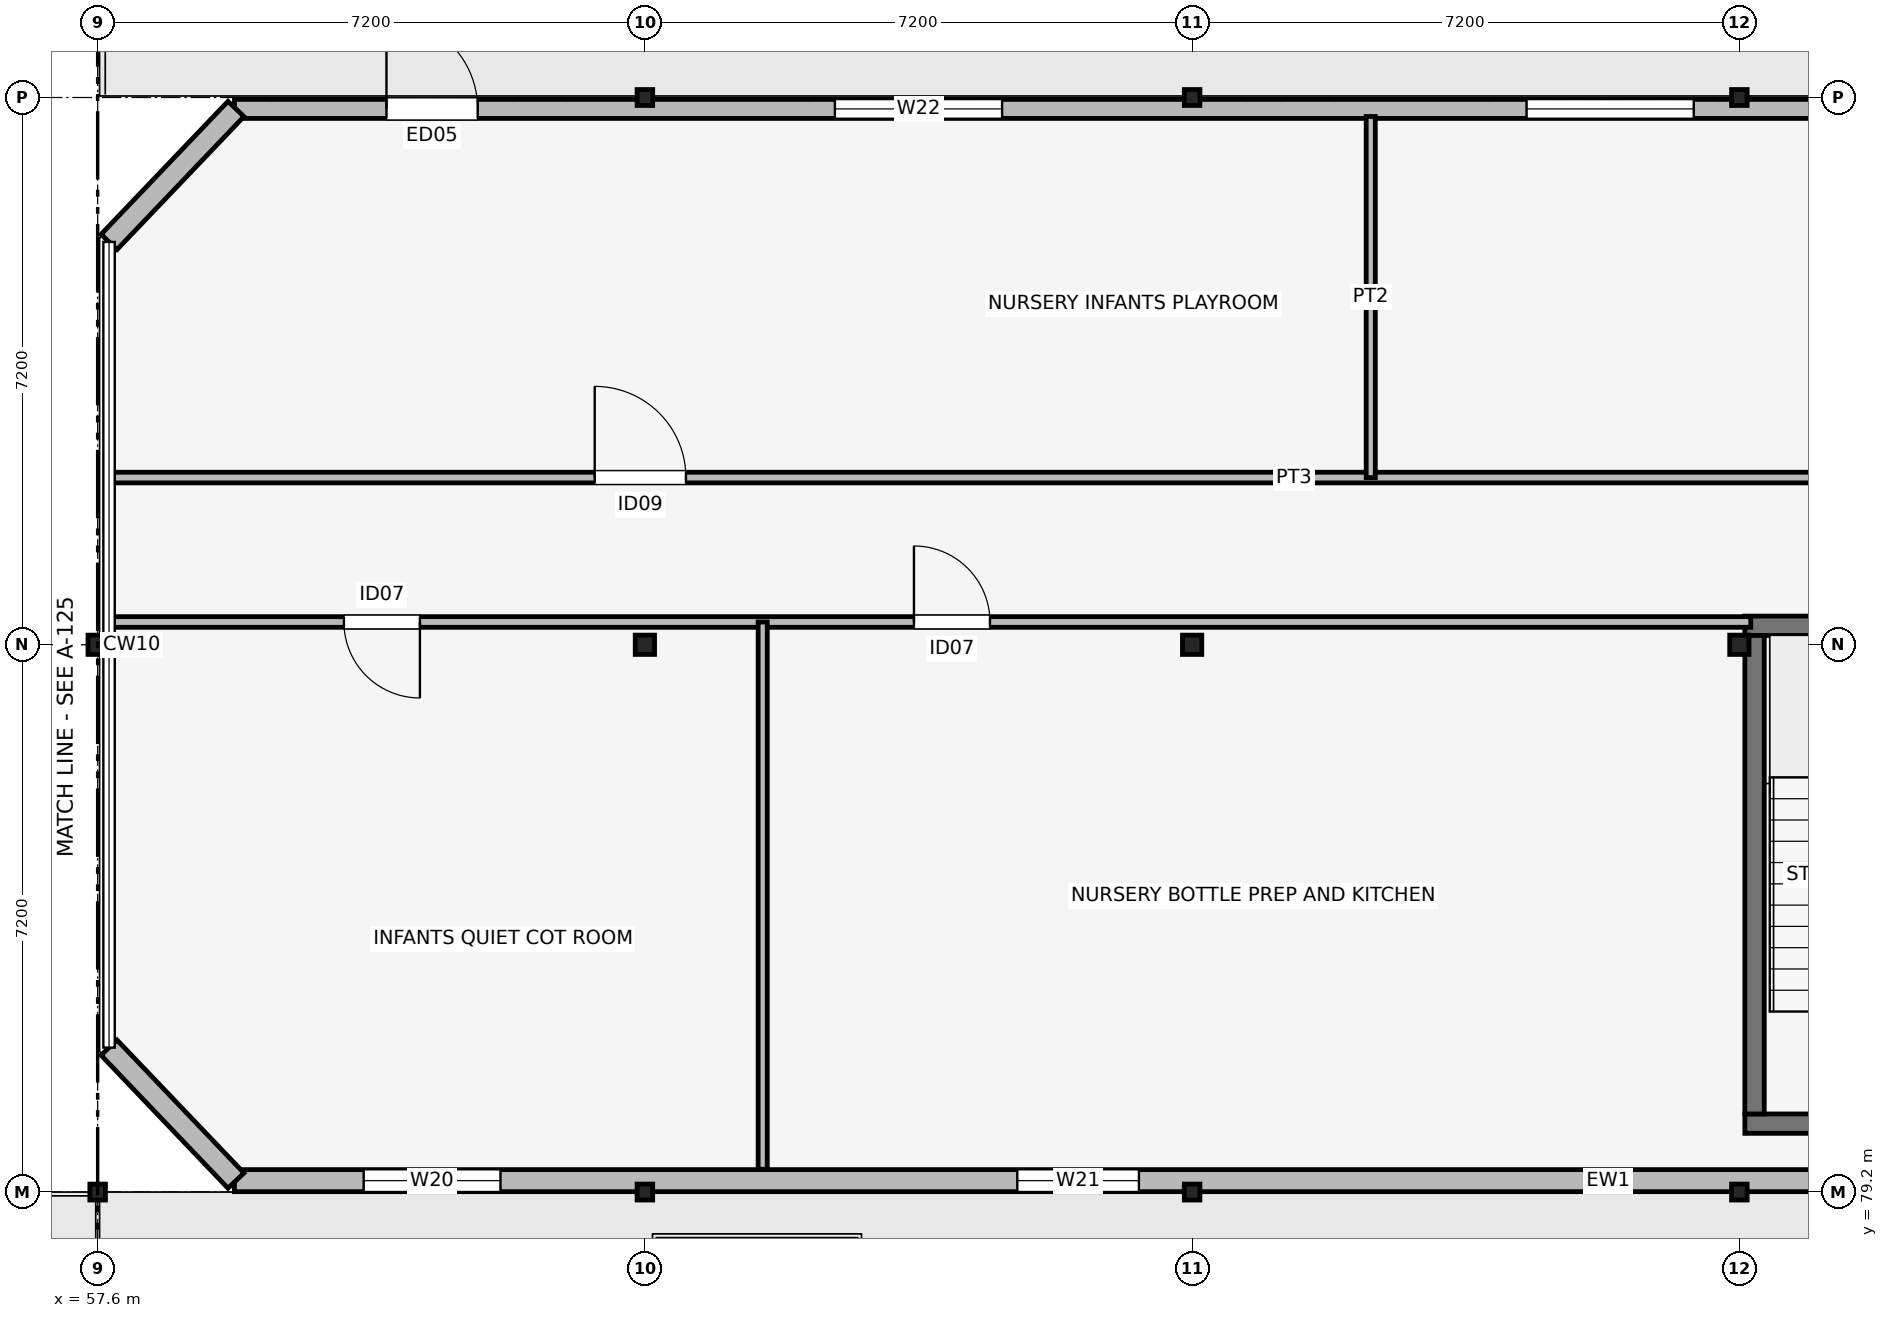
"""IFC4 building model, lengths in metres.
Left out: names, types, materials, properties, quantities, classifications, styles, units other than length and angle.
Written with IfcOpenShell. Run it as: python <this file> out.ifc"""

import sys

from ifc_helpers import new_model, si_unit, direction, frame, frame_2d, origin, origin_2d, place, context, subcontext, project, spatial, rectangle, i_section, extrude, element, fill, save


model = new_model("IFC4")
c1 = context("Model", 3, precision=1e-05, world=origin(), true_north=direction((0.0, 1.0)))
c2 = subcontext(c1, "Body", "Model", "MODEL_VIEW")
j1 = project(units=[si_unit("LENGTHUNIT", "METRE"), si_unit("PLANEANGLEUNIT", "RADIAN")], contexts=[c1])
p1 = place(None, origin())
s1 = spatial("IfcSite", under=j1, at=p1, CompositionType="ELEMENT")
p2 = place(p1, origin())
s2 = spatial("IfcBuilding", under=s1, at=p2, CompositionType="ELEMENT")
p3 = place(p2, frame((0.0, 0.0, 4.5)))
s3 = spatial("IfcBuildingStorey", under=s2, at=p3, CompositionType="ELEMENT", Elevation=4.5)
p4 = place(p3, frame((57.6, 79.2, 0.0), z_axis=(0.0, 0.0, 1.0), x_axis=(1.0, 0.0, 0.0)))
e1 = element("IfcColumn", 1, at=p4, inside=s3, PredefinedType="COLUMN", context=c2, shape_type="SweptSolid", body=[
    extrude(i_section(OverallWidth=0.205, OverallDepth=0.21, WebThickness=0.009, FlangeThickness=0.014, FilletRadius=0.01, at=origin_2d()), origin(), (0.0, 0.0, 1.0), 4.2),
])
p5 = place(p3, frame((57.6, 86.4, 0.0), z_axis=(0.0, 0.0, 1.0), x_axis=(1.0, 0.0, 0.0)))
e2 = element("IfcColumn", 2, at=p5, inside=s3, PredefinedType="COLUMN", context=c2, shape_type="SweptSolid", body=[
    extrude(i_section(OverallWidth=0.254, OverallDepth=0.254, WebThickness=0.009, FlangeThickness=0.014, FilletRadius=0.013, at=origin_2d()), origin(), (0.0, 0.0, 1.0), 4.2),
])
p6 = place(p3, frame((64.8, 79.2, 0.0), z_axis=(0.0, 0.0, 1.0), x_axis=(1.0, 0.0, 0.0)))
e3 = element("IfcColumn", 3, at=p6, inside=s3, PredefinedType="COLUMN", context=c2, shape_type="SweptSolid", body=[
    extrude(i_section(OverallWidth=0.205, OverallDepth=0.21, WebThickness=0.009, FlangeThickness=0.014, FilletRadius=0.01, at=origin_2d()), origin(), (0.0, 0.0, 1.0), 4.2),
])
p7 = place(p3, frame((64.8, 86.4, 0.0), z_axis=(0.0, 0.0, 1.0), x_axis=(1.0, 0.0, 0.0)))
e4 = element("IfcColumn", 4, at=p7, inside=s3, PredefinedType="COLUMN", context=c2, shape_type="SweptSolid", body=[
    extrude(i_section(OverallWidth=0.254, OverallDepth=0.254, WebThickness=0.009, FlangeThickness=0.014, FilletRadius=0.013, at=origin_2d()), origin(), (0.0, 0.0, 1.0), 4.2),
])
for number, where, z_axis, x_axis in (
    (5, (64.8, 93.6, 0.0), (0.0, 0.0, 1.0), (1.0, 0.0, 0.0)),
    (6, (72.0, 79.2, 0.0), (0.0, 0.0, 1.0), (1.0, 0.0, 0.0)),
):
    element("IfcColumn", number, at=place(p3, frame(where, z_axis=z_axis, x_axis=x_axis)), inside=s3, PredefinedType="COLUMN", context=c2, shape_type="SweptSolid", body=[
        extrude(i_section(OverallWidth=0.205, OverallDepth=0.21, WebThickness=0.009, FlangeThickness=0.014, FilletRadius=0.01, at=origin_2d()), origin(), (0.0, 0.0, 1.0), 4.2),
    ])
p8 = place(p3, frame((72.0, 86.4, 0.0), z_axis=(0.0, 0.0, 1.0), x_axis=(1.0, 0.0, 0.0)))
e7 = element("IfcColumn", 7, at=p8, inside=s3, PredefinedType="COLUMN", context=c2, shape_type="SweptSolid", body=[
    extrude(i_section(OverallWidth=0.254, OverallDepth=0.254, WebThickness=0.009, FlangeThickness=0.014, FilletRadius=0.013, at=origin_2d()), origin(), (0.0, 0.0, 1.0), 4.2),
])
for number, where, z_axis, x_axis in (
    (8, (72.0, 93.6, 0.0), (0.0, 0.0, 1.0), (1.0, 0.0, 0.0)),
    (9, (79.2, 79.2, 0.0), (0.0, 0.0, 1.0), (1.0, 0.0, 0.0)),
):
    element("IfcColumn", number, at=place(p3, frame(where, z_axis=z_axis, x_axis=x_axis)), inside=s3, PredefinedType="COLUMN", context=c2, shape_type="SweptSolid", body=[
        extrude(i_section(OverallWidth=0.205, OverallDepth=0.21, WebThickness=0.009, FlangeThickness=0.014, FilletRadius=0.01, at=origin_2d()), origin(), (0.0, 0.0, 1.0), 4.2),
    ])
p9 = place(p3, frame((79.2, 86.4, 0.0), z_axis=(0.0, 0.0, 1.0), x_axis=(1.0, 0.0, 0.0)))
e10 = element("IfcColumn", 10, at=p9, inside=s3, PredefinedType="COLUMN", context=c2, shape_type="SweptSolid", body=[
    extrude(i_section(OverallWidth=0.254, OverallDepth=0.254, WebThickness=0.009, FlangeThickness=0.014, FilletRadius=0.013, at=origin_2d()), origin(), (0.0, 0.0, 1.0), 4.2),
])
p10 = place(p3, frame((79.2, 93.6, 0.0), z_axis=(0.0, 0.0, 1.0), x_axis=(1.0, 0.0, 0.0)))
e11 = element("IfcColumn", 11, at=p10, inside=s3, PredefinedType="COLUMN", context=c2, shape_type="SweptSolid", body=[
    extrude(i_section(OverallWidth=0.205, OverallDepth=0.21, WebThickness=0.009, FlangeThickness=0.014, FilletRadius=0.01, at=origin_2d()), origin(), (0.0, 0.0, 1.0), 4.2),
])
for number, where, z_axis, x_axis in (
    (12, (79.272, 80.1, 0.0), (0.0, 0.0, 1.0), (1.0, 0.0, 0.0)),
    (13, (79.272, 86.65, 0.0), (0.0, 0.0, 1.0), (1.0, 0.0, 0.0)),
):
    element("IfcWall", number, at=place(p3, frame(where, z_axis=z_axis, x_axis=x_axis)), inside=s3, PredefinedType="SHEAR", context=c2, shape_type="SweptSolid", body=[
        extrude(rectangle(XDim=3.305, YDim=0.255, at=frame_2d((1.652, 0.0))), origin(), (0.0, 0.0, 1.0), 4.2),
    ])
p11 = place(p3, frame((79.4, 80.228, 0.0), z_axis=(0.0, 0.0, 1.0), x_axis=(0.0, 1.0, 0.0)))
e14 = element("IfcWall", 14, at=p11, inside=s3, PredefinedType="SHEAR", context=c2, shape_type="SweptSolid", body=[
    extrude(rectangle(XDim=6.295, YDim=0.255, at=frame_2d((3.147, 0.0))), origin(), (0.0, 0.0, 1.0), 4.2),
])
p12 = place(p3, frame((59.4, 79.35, 0.0), z_axis=(0.0, 0.0, 1.0), x_axis=(1.0, 0.0, 0.0)))
e15 = element("IfcWall", 15, at=p12, inside=s3, PredefinedType="SOLIDWALL", context=c2, shape_type="SweptSolid", body=[
    extrude(rectangle(XDim=46.8, YDim=0.29, at=frame_2d((23.4, 0.0))), origin(), (0.0, 0.0, 1.0), 3.448),
])
p13 = place(p12, frame((25.75, 0.0, 0.0), z_axis=(0.0, 0.0, 1.0), x_axis=(-1.0, 0.0, 0.0)))
e16 = element("IfcOpeningElement", 16, at=p13, cuts=e15, PredefinedType="OPENING", context=c2, shape_type="SweptSolid", body=[
    extrude(rectangle(XDim=1.5, YDim=2.35, at=frame_2d((0.75, 1.175))), frame((0.0, 0.155, 0.0), z_axis=(0.0, -1.0, 0.0), x_axis=(1.0, 0.0, 0.0)), (0.0, 0.0, 1.0), 0.31),
])
p14 = place(p12, frame((44.8, 0.0, 0.0), z_axis=(0.0, 0.0, 1.0), x_axis=(-1.0, 0.0, 0.0)))
e17 = element("IfcOpeningElement", 17, at=p14, cuts=e15, PredefinedType="OPENING", context=c2, shape_type="SweptSolid", body=[
    extrude(rectangle(XDim=1.2, YDim=2.2, at=frame_2d((0.6, 1.1))), frame((0.0, 0.155, 0.0), z_axis=(0.0, -1.0, 0.0), x_axis=(1.0, 0.0, 0.0)), (0.0, 0.0, 1.0), 0.31),
])
p15 = place(p12, frame((1.7, 0.0, 1.1)))
e18 = element("IfcOpeningElement", 18, at=p15, cuts=e15, PredefinedType="OPENING", context=c2, shape_type="SweptSolid", body=[
    extrude(rectangle(XDim=1.8, YDim=1.2, at=frame_2d((0.9, 0.6))), frame((0.0, 0.155, 0.0), z_axis=(0.0, -1.0, 0.0), x_axis=(1.0, 0.0, 0.0)), (0.0, 0.0, 1.0), 0.31),
])
p16 = place(p12, frame((10.3, 0.0, 0.75)))
e19 = element("IfcOpeningElement", 19, at=p16, cuts=e15, PredefinedType="OPENING", context=c2, shape_type="SweptSolid", body=[
    extrude(rectangle(XDim=1.6, YDim=2.0, at=frame_2d((0.8, 1.0))), frame((0.0, 0.155, 0.0), z_axis=(0.0, -1.0, 0.0), x_axis=(1.0, 0.0, 0.0)), (0.0, 0.0, 1.0), 0.31),
])
p17 = place(p12, frame((29.8, 0.0, 0.75)))
e20 = element("IfcOpeningElement", 20, at=p17, cuts=e15, PredefinedType="OPENING", context=c2, shape_type="SweptSolid", body=[
    extrude(rectangle(XDim=1.6, YDim=2.0, at=frame_2d((0.8, 1.0))), frame((0.0, 0.155, 0.0), z_axis=(0.0, -1.0, 0.0), x_axis=(1.0, 0.0, 0.0)), (0.0, 0.0, 1.0), 0.31),
])
p18 = place(p12, frame((37.0, 0.0, 0.75)))
e21 = element("IfcOpeningElement", 21, at=p18, cuts=e15, PredefinedType="OPENING", context=c2, shape_type="SweptSolid", body=[
    extrude(rectangle(XDim=1.6, YDim=2.0, at=frame_2d((0.8, 1.0))), frame((0.0, 0.155, 0.0), z_axis=(0.0, -1.0, 0.0), x_axis=(1.0, 0.0, 0.0)), (0.0, 0.0, 1.0), 0.31),
])
p19 = place(p3, frame((59.4, 93.45, 0.0), z_axis=(0.0, 0.0, 1.0), x_axis=(1.0, 0.0, 0.0)))
e22 = element("IfcWall", 22, at=p19, inside=s3, PredefinedType="SOLIDWALL", context=c2, shape_type="SweptSolid", body=[
    extrude(rectangle(XDim=46.8, YDim=0.25, at=frame_2d((23.4, 0.0))), origin(), (0.0, 0.0, 1.0), 3.448),
])
p20 = place(p19, frame((2.0, 0.0, 0.0)))
e23 = element("IfcOpeningElement", 23, at=p20, cuts=e22, PredefinedType="OPENING", context=c2, shape_type="SweptSolid", body=[
    extrude(rectangle(XDim=1.2, YDim=2.2, at=frame_2d((0.6, 1.1))), frame((0.0, 0.135, 0.0), z_axis=(0.0, -1.0, 0.0), x_axis=(1.0, 0.0, 0.0)), (0.0, 0.0, 1.0), 0.27),
])
p21 = place(p19, frame((7.9, 0.0, 0.65)))
e24 = element("IfcOpeningElement", 24, at=p21, cuts=e22, PredefinedType="OPENING", context=c2, shape_type="SweptSolid", body=[
    extrude(rectangle(XDim=2.2, YDim=2.05, at=frame_2d((1.1, 1.025))), frame((0.0, 0.135, 0.0), z_axis=(0.0, -1.0, 0.0), x_axis=(1.0, 0.0, 0.0)), (0.0, 0.0, 1.0), 0.27),
])
p22 = place(p19, frame((22.8, 0.0, 0.0)))
e25 = element("IfcOpeningElement", 25, at=p22, cuts=e22, PredefinedType="OPENING", context=c2, shape_type="SweptSolid", body=[
    extrude(rectangle(XDim=1.2, YDim=2.2, at=frame_2d((0.6, 1.1))), frame((0.0, 0.135, 0.0), z_axis=(0.0, -1.0, 0.0), x_axis=(1.0, 0.0, 0.0)), (0.0, 0.0, 1.0), 0.27),
])
p23 = place(p19, frame((17.0, 0.0, 0.65)))
e26 = element("IfcOpeningElement", 26, at=p23, cuts=e22, PredefinedType="OPENING", context=c2, shape_type="SweptSolid", body=[
    extrude(rectangle(XDim=2.2, YDim=2.05, at=frame_2d((1.1, 1.025))), frame((0.0, 0.135, 0.0), z_axis=(0.0, -1.0, 0.0), x_axis=(1.0, 0.0, 0.0)), (0.0, 0.0, 1.0), 0.27),
])
p24 = place(p19, frame((37.2, 0.0, 0.0)))
e27 = element("IfcOpeningElement", 27, at=p24, cuts=e22, PredefinedType="OPENING", context=c2, shape_type="SweptSolid", body=[
    extrude(rectangle(XDim=1.2, YDim=2.2, at=frame_2d((0.6, 1.1))), frame((0.0, 0.135, 0.0), z_axis=(0.0, -1.0, 0.0), x_axis=(1.0, 0.0, 0.0)), (0.0, 0.0, 1.0), 0.27),
])
p25 = place(p19, frame((42.5, 0.0, 0.65)))
e28 = element("IfcOpeningElement", 28, at=p25, cuts=e22, PredefinedType="OPENING", context=c2, shape_type="SweptSolid", body=[
    extrude(rectangle(XDim=2.6, YDim=2.05, at=frame_2d((1.3, 1.025))), frame((0.0, 0.135, 0.0), z_axis=(0.0, -1.0, 0.0), x_axis=(1.0, 0.0, 0.0)), (0.0, 0.0, 1.0), 0.27),
])
p26 = place(p3, frame((59.42, 79.35, 0.0), z_axis=(0.0, 0.0, 1.0), x_axis=(-0.690360514167, 0.723465521279, 0.0)))
e29 = element("IfcWall", 29, at=p26, inside=s3, PredefinedType="SOLIDWALL", context=c2, shape_type="SweptSolid", body=[
    extrude(rectangle(XDim=2.419, YDim=0.29, at=frame_2d((1.209, 0.0))), origin(), (0.0, 0.0, 1.0), 3.448),
])
p27 = place(p3, frame((57.75, 91.7, 0.0), z_axis=(0.0, 0.0, 1.0), x_axis=(0.690360514167, 0.723465521279, 0.0)))
e30 = element("IfcWall", 30, at=p27, inside=s3, PredefinedType="SOLIDWALL", context=c2, shape_type="SweptSolid", body=[
    extrude(rectangle(XDim=2.419, YDim=0.29, at=frame_2d((1.209, 0.0))), origin(), (0.0, 0.0, 1.0), 3.55),
])
p28 = place(p3, frame((57.74, 88.6, 0.0), z_axis=(0.0, 0.0, 1.0), x_axis=(1.0, 0.0, 0.0)))
e31 = element("IfcWall", 31, at=p28, inside=s3, PredefinedType="PARTITIONING", context=c2, shape_type="SweptSolid", body=[
    extrude(rectangle(XDim=50.12, YDim=0.14, at=frame_2d((25.06, 0.0))), origin(), (0.0, 0.0, 1.0), 3.2),
])
p29 = place(p28, frame((6.4, 0.0, 0.0)))
e32 = element("IfcOpeningElement", 32, at=p29, cuts=e31, PredefinedType="OPENING", context=c2, shape_type="SweptSolid", body=[
    extrude(rectangle(XDim=1.2, YDim=2.18, at=frame_2d((0.6, 1.09))), frame((0.0, 0.08, 0.0), z_axis=(0.0, -1.0, 0.0), x_axis=(1.0, 0.0, 0.0)), (0.0, 0.0, 1.0), 0.16),
])
p30 = place(p28, frame((24.8, 0.0, 0.0), z_axis=(0.0, 0.0, 1.0), x_axis=(-1.0, 0.0, 0.0)))
e33 = element("IfcOpeningElement", 33, at=p30, cuts=e31, PredefinedType="OPENING", context=c2, shape_type="SweptSolid", body=[
    extrude(rectangle(XDim=1.2, YDim=2.18, at=frame_2d((0.6, 1.09))), frame((0.0, 0.08, 0.0), z_axis=(0.0, -1.0, 0.0), x_axis=(1.0, 0.0, 0.0)), (0.0, 0.0, 1.0), 0.16),
])
p31 = place(p28, frame((40.8, 0.0, 0.0)))
e34 = element("IfcOpeningElement", 34, at=p31, cuts=e31, PredefinedType="OPENING", context=c2, shape_type="SweptSolid", body=[
    extrude(rectangle(XDim=1.2, YDim=2.18, at=frame_2d((0.6, 1.09))), frame((0.0, 0.08, 0.0), z_axis=(0.0, -1.0, 0.0), x_axis=(1.0, 0.0, 0.0)), (0.0, 0.0, 1.0), 0.16),
])
p32 = place(p3, frame((74.35, 88.6, 0.0), z_axis=(0.0, 0.0, 1.0), x_axis=(0.0, 1.0, 0.0)))
e35 = element("IfcWall", 35, at=p32, inside=s3, PredefinedType="PARTITIONING", context=c2, shape_type="SweptSolid", body=[
    extrude(rectangle(XDim=4.75, YDim=0.12, at=frame_2d((2.375, 0.0))), origin(), (0.0, 0.0, 1.0), 3.2),
])
p33 = place(p3, frame((57.74, 86.7, 0.0), z_axis=(0.0, 0.0, 1.0), x_axis=(1.0, 0.0, 0.0)))
e36 = element("IfcWall", 36, at=p33, inside=s3, PredefinedType="PARTITIONING", context=c2, shape_type="SweptSolid", body=[
    extrude(rectangle(XDim=21.61, YDim=0.14, at=frame_2d((10.805, 0.0))), origin(), (0.0, 0.0, 1.0), 3.2),
])
p34 = place(p33, frame((4.1, 0.0, 0.0), z_axis=(0.0, 0.0, 1.0), x_axis=(-1.0, 0.0, 0.0)))
e37 = element("IfcOpeningElement", 37, at=p34, cuts=e36, PredefinedType="OPENING", context=c2, shape_type="SweptSolid", body=[
    extrude(rectangle(XDim=1.0, YDim=2.12, at=frame_2d((0.5, 1.06))), frame((0.0, 0.08, 0.0), z_axis=(0.0, -1.0, 0.0), x_axis=(1.0, 0.0, 0.0)), (0.0, 0.0, 1.0), 0.16),
])
p35 = place(p33, frame((10.6, 0.0, 0.0)))
e38 = element("IfcOpeningElement", 38, at=p35, cuts=e36, PredefinedType="OPENING", context=c2, shape_type="SweptSolid", body=[
    extrude(rectangle(XDim=1.0, YDim=2.12, at=frame_2d((0.5, 1.06))), frame((0.0, 0.08, 0.0), z_axis=(0.0, -1.0, 0.0), x_axis=(1.0, 0.0, 0.0)), (0.0, 0.0, 1.0), 0.16),
])
p36 = place(p3, frame((66.35, 79.5, 0.0), z_axis=(0.0, 0.0, 1.0), x_axis=(0.0, 1.0, 0.0)))
e39 = element("IfcWall", 39, at=p36, inside=s3, PredefinedType="PARTITIONING", context=c2, shape_type="SweptSolid", body=[
    extrude(rectangle(XDim=7.2, YDim=0.12, at=frame_2d((3.6, 0.0))), origin(), (0.0, 0.0, 1.0), 3.2),
])
p37 = place(p15, origin())
e40 = element("IfcWindow", 40, at=p37, inside=s3, PartitioningType="SINGLE_PANEL", PredefinedType="WINDOW", context=c2, shape_type="SweptSolid", body=[
    extrude(rectangle(XDim=1.8, YDim=1.2, at=frame_2d((0.9, 0.6))), frame((0.0, 0.03, 0.0), z_axis=(0.0, -1.0, 0.0), x_axis=(1.0, 0.0, 0.0)), (0.0, 0.0, 1.0), 0.06),
])
fill(e18, e40)
p38 = place(p16, origin())
e41 = element("IfcWindow", 41, at=p38, inside=s3, PartitioningType="SINGLE_PANEL", PredefinedType="WINDOW", context=c2, shape_type="SweptSolid", body=[
    extrude(rectangle(XDim=1.6, YDim=2.0, at=frame_2d((0.8, 1.0))), frame((0.0, 0.03, 0.0), z_axis=(0.0, -1.0, 0.0), x_axis=(1.0, 0.0, 0.0)), (0.0, 0.0, 1.0), 0.06),
])
fill(e19, e41)
p39 = place(p20, origin())
e42 = element("IfcDoor", 42, at=p39, inside=s3, OperationType="SINGLE_SWING_LEFT", PredefinedType="DOOR", context=c2, shape_type="SweptSolid", body=[
    extrude(rectangle(XDim=1.2, YDim=2.2, at=frame_2d((0.6, 1.1))), frame((0.0, 0.025, 0.0), z_axis=(0.0, -1.0, 0.0), x_axis=(1.0, 0.0, 0.0)), (0.0, 0.0, 1.0), 0.05),
])
fill(e23, e42)
p40 = place(p21, origin())
e43 = element("IfcWindow", 43, at=p40, inside=s3, PartitioningType="SINGLE_PANEL", PredefinedType="WINDOW", context=c2, shape_type="SweptSolid", body=[
    extrude(rectangle(XDim=2.2, YDim=2.05, at=frame_2d((1.1, 1.025))), frame((0.0, 0.03, 0.0), z_axis=(0.0, -1.0, 0.0), x_axis=(1.0, 0.0, 0.0)), (0.0, 0.0, 1.0), 0.06),
])
fill(e24, e43)
p41 = place(p23, origin())
e44 = element("IfcWindow", 44, at=p41, inside=s3, PartitioningType="SINGLE_PANEL", PredefinedType="WINDOW", context=c2, shape_type="SweptSolid", body=[
    extrude(rectangle(XDim=2.2, YDim=2.05, at=frame_2d((1.1, 1.025))), frame((0.0, 0.03, 0.0), z_axis=(0.0, -1.0, 0.0), x_axis=(1.0, 0.0, 0.0)), (0.0, 0.0, 1.0), 0.06),
])
fill(e26, e44)
p42 = place(p29, origin())
e45 = element("IfcDoor", 45, at=p42, inside=s3, OperationType="SINGLE_SWING_LEFT", PredefinedType="DOOR", context=c2, shape_type="SweptSolid", body=[
    extrude(rectangle(XDim=1.2, YDim=2.18, at=frame_2d((0.6, 1.09))), frame((0.0, 0.025, 0.0), z_axis=(0.0, -1.0, 0.0), x_axis=(1.0, 0.0, 0.0)), (0.0, 0.0, 1.0), 0.05),
])
fill(e32, e45)
p43 = place(p34, origin())
e46 = element("IfcDoor", 46, at=p43, inside=s3, OperationType="SINGLE_SWING_RIGHT", PredefinedType="DOOR", context=c2, shape_type="SweptSolid", body=[
    extrude(rectangle(XDim=1.0, YDim=2.12, at=frame_2d((0.5, 1.06))), frame((0.0, 0.025, 0.0), z_axis=(0.0, -1.0, 0.0), x_axis=(1.0, 0.0, 0.0)), (0.0, 0.0, 1.0), 0.05),
])
fill(e37, e46)
p44 = place(p35, origin())
e47 = element("IfcDoor", 47, at=p44, inside=s3, OperationType="SINGLE_SWING_LEFT", PredefinedType="DOOR", context=c2, shape_type="SweptSolid", body=[
    extrude(rectangle(XDim=1.0, YDim=2.12, at=frame_2d((0.5, 1.06))), frame((0.0, 0.025, 0.0), z_axis=(0.0, -1.0, 0.0), x_axis=(1.0, 0.0, 0.0)), (0.0, 0.0, 1.0), 0.05),
])
fill(e38, e47)
save(model, sys.argv[1])
